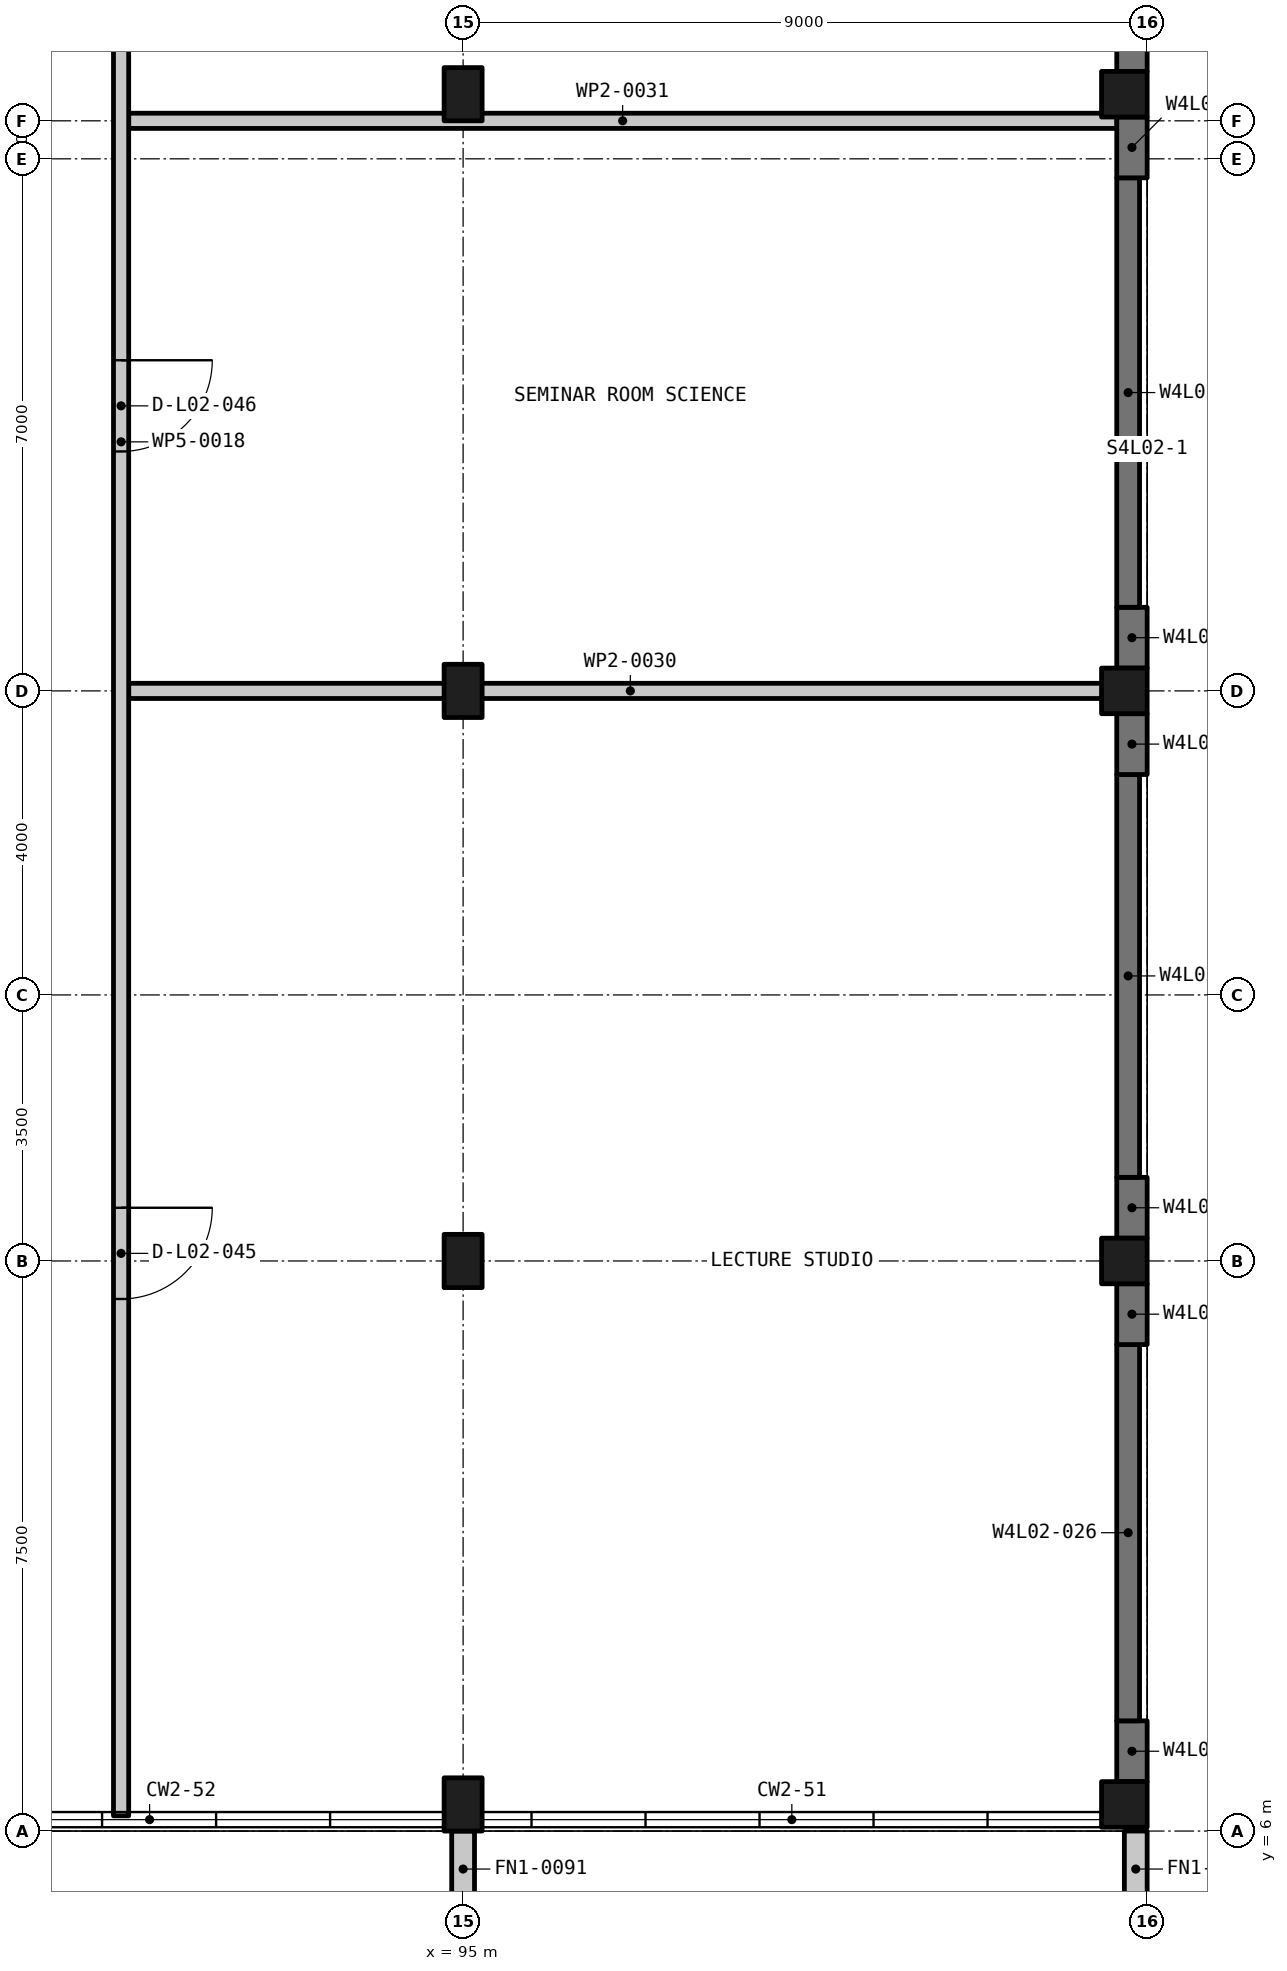
"""IFC4 building model, lengths in metres.
Left out: names, types, materials, properties, quantities, classifications, styles, units other than length and angle.
Written with IfcOpenShell. Run it as: python <this file> out.ifc"""

import sys

from ifc_helpers import new_model, si_unit, direction, frame, frame_2d, origin, origin_2d, place, context, subcontext, project, spatial, rectangle, extrude, element, fill, save


model = new_model("IFC4")
c1 = context("Model", 3, precision=1e-05, world=origin(), true_north=direction((0.0, 1.0)))
c2 = subcontext(c1, "Body", "Model", "MODEL_VIEW")
j1 = project(units=[si_unit("LENGTHUNIT", "METRE"), si_unit("PLANEANGLEUNIT", "RADIAN")], contexts=[c1])
p1 = place(None, origin())
s1 = spatial("IfcSite", under=j1, at=p1, CompositionType="ELEMENT")
p2 = place(p1, origin())
s2 = spatial("IfcBuilding", under=s1, at=p2, CompositionType="ELEMENT")
p3 = place(p2, frame((0.0, 0.0, 11.25)))
s3 = spatial("IfcBuildingStorey", under=s2, at=p3, CompositionType="ELEMENT", Elevation=11.25)
for number, where, z_axis, x_axis in (
    (1, (95.0, 6.35, -0.3), (0.0, 0.0, 1.0), (1.0, 0.0, 0.0)),
    (2, (95.0, 13.5, -0.3), (0.0, 0.0, 1.0), (1.0, 0.0, 0.0)),
    (3, (95.0, 21.0, -0.3), (0.0, 0.0, 1.0), (1.0, 0.0, 0.0)),
    (4, (95.0, 28.85, -0.3), (0.0, 0.0, 1.0), (1.0, 0.0, 0.0)),
):
    element("IfcColumn", number, at=place(p3, frame(where, z_axis=z_axis, x_axis=x_axis)), inside=s3, PredefinedType="COLUMN", context=c2, shape_type="SweptSolid", body=[
        extrude(rectangle(XDim=0.5, YDim=0.7, at=origin_2d()), origin(), (0.0, 0.0, 1.0), 4.5),
    ])
for number, where, z_axis, x_axis in (
    (5, (103.7, 6.35, -0.3), (0.0, 0.0, 1.0), (1.0, 0.0, 0.0)),
    (6, (103.7, 13.5, -0.3), (0.0, 0.0, 1.0), (1.0, 0.0, 0.0)),
    (7, (103.7, 21.0, -0.3), (0.0, 0.0, 1.0), (1.0, 0.0, 0.0)),
    (8, (103.7, 28.85, -0.3), (0.0, 0.0, 1.0), (1.0, 0.0, 0.0)),
):
    element("IfcColumn", number, at=place(p3, frame(where, z_axis=z_axis, x_axis=x_axis)), inside=s3, PredefinedType="COLUMN", context=c2, shape_type="SweptSolid", body=[
        extrude(rectangle(XDim=0.6, YDim=0.6, at=origin_2d()), origin(), (0.0, 0.0, 1.0), 4.5),
    ])
p4 = place(p3, frame((103.8, 6.65, -0.3), z_axis=(0.0, 0.0, 1.0), x_axis=(0.0, 1.0, 0.0)))
e9 = element("IfcWall", 9, at=p4, inside=s3, PredefinedType="SOLIDWALL", context=c2, shape_type="SweptSolid", body=[
    extrude(rectangle(XDim=0.8, YDim=0.4, at=frame_2d((0.4, 0.0))), origin(), (0.0, 0.0, 1.0), 4.5),
])
p5 = place(p3, frame((103.75, 7.45, -0.3), z_axis=(0.0, 0.0, 1.0), x_axis=(0.0, 1.0, 0.0)))
e10 = element("IfcWall", 10, at=p5, inside=s3, PredefinedType="SOLIDWALL", context=c2, shape_type="SweptSolid", body=[
    extrude(rectangle(XDim=4.95, YDim=0.3, at=frame_2d((2.475, 0.0))), origin(), (0.0, 0.0, 1.0), 4.5),
])
for number, where, z_axis, x_axis in (
    (11, (103.8, 12.4, -0.3), (0.0, 0.0, 1.0), (0.0, 1.0, 0.0)),
    (12, (103.8, 13.8, -0.3), (0.0, 0.0, 1.0), (0.0, 1.0, 0.0)),
):
    element("IfcWall", number, at=place(p3, frame(where, z_axis=z_axis, x_axis=x_axis)), inside=s3, PredefinedType="SOLIDWALL", context=c2, shape_type="SweptSolid", body=[
        extrude(rectangle(XDim=0.8, YDim=0.4, at=frame_2d((0.4, 0.0))), origin(), (0.0, 0.0, 1.0), 4.5),
    ])
p6 = place(p3, frame((103.75, 14.6, -0.3), z_axis=(0.0, 0.0, 1.0), x_axis=(0.0, 1.0, 0.0)))
e13 = element("IfcWall", 13, at=p6, inside=s3, PredefinedType="SOLIDWALL", context=c2, shape_type="SweptSolid", body=[
    extrude(rectangle(XDim=5.3, YDim=0.3, at=frame_2d((2.65, 0.0))), origin(), (0.0, 0.0, 1.0), 4.5),
])
for number, where, z_axis, x_axis in (
    (14, (103.8, 19.9, -0.3), (0.0, 0.0, 1.0), (0.0, 1.0, 0.0)),
    (15, (103.8, 21.3, -0.3), (0.0, 0.0, 1.0), (0.0, 1.0, 0.0)),
):
    element("IfcWall", number, at=place(p3, frame(where, z_axis=z_axis, x_axis=x_axis)), inside=s3, PredefinedType="SOLIDWALL", context=c2, shape_type="SweptSolid", body=[
        extrude(rectangle(XDim=0.8, YDim=0.4, at=frame_2d((0.4, 0.0))), origin(), (0.0, 0.0, 1.0), 4.5),
    ])
p7 = place(p3, frame((103.75, 22.1, -0.3), z_axis=(0.0, 0.0, 1.0), x_axis=(0.0, 1.0, 0.0)))
e16 = element("IfcWall", 16, at=p7, inside=s3, PredefinedType="SOLIDWALL", context=c2, shape_type="SweptSolid", body=[
    extrude(rectangle(XDim=5.65, YDim=0.3, at=frame_2d((2.825, 0.0))), origin(), (0.0, 0.0, 1.0), 4.5),
])
for number, where, z_axis, x_axis in (
    (17, (103.8, 27.75, -0.3), (0.0, 0.0, 1.0), (0.0, 1.0, 0.0)),
    (18, (103.8, 29.15, -0.3), (0.0, 0.0, 1.0), (0.0, 1.0, 0.0)),
):
    element("IfcWall", number, at=place(p3, frame(where, z_axis=z_axis, x_axis=x_axis)), inside=s3, PredefinedType="SOLIDWALL", context=c2, shape_type="SweptSolid", body=[
        extrude(rectangle(XDim=0.8, YDim=0.4, at=frame_2d((0.4, 0.0))), origin(), (0.0, 0.0, 1.0), 4.5),
    ])
for number, where, z_axis, x_axis in (
    (19, (95.0, 6.0, 0.0), (0.0, 0.0, 1.0), (0.0, -1.0, 0.0)),
    (20, (103.85, 6.0, 0.0), (0.0, 0.0, 1.0), (0.0, -1.0, 0.0)),
):
    element("IfcWall", number, at=place(p3, frame(where, z_axis=z_axis, x_axis=x_axis)), inside=s3, PredefinedType="SOLIDWALL", context=c2, shape_type="SweptSolid", body=[
        extrude(rectangle(XDim=1.0, YDim=0.3, at=frame_2d((0.5, 0.0))), origin(), (0.0, 0.0, 1.0), 4.5),
    ])
p8 = place(p3, frame((90.6, 21.0, 0.0), z_axis=(0.0, 0.0, 1.0), x_axis=(1.0, 0.0, 0.0)))
e21 = element("IfcWall", 21, at=p8, inside=s3, PredefinedType="PARTITIONING", context=c2, shape_type="SweptSolid", body=[
    extrude(rectangle(XDim=13.2, YDim=0.2, at=frame_2d((6.6, 0.0))), origin(), (0.0, 0.0, 1.0), 3.3),
])
p9 = place(p3, frame((90.6, 28.5, 0.0), z_axis=(0.0, 0.0, 1.0), x_axis=(1.0, 0.0, 0.0)))
e22 = element("IfcWall", 22, at=p9, inside=s3, PredefinedType="PARTITIONING", context=c2, shape_type="SweptSolid", body=[
    extrude(rectangle(XDim=12.998, YDim=0.2, at=frame_2d((6.499, 0.0))), origin(), (0.0, 0.0, 1.0), 3.4),
])
p10 = place(p3, frame((90.5, 80.8, 0.0), z_axis=(0.0, 0.0, 1.0), x_axis=(0.0, -1.0, 0.0)))
e23 = element("IfcWall", 23, at=p10, inside=s3, PredefinedType="PARTITIONING", context=c2, shape_type="SweptSolid", body=[
    extrude(rectangle(XDim=74.6, YDim=0.2, at=frame_2d((37.3, 0.0))), origin(), (0.0, 0.0, 1.0), 3.3),
])
p11 = place(p10, frame((66.6, 0.0, 0.0)))
e24 = element("IfcOpeningElement", 24, at=p11, cuts=e23, PredefinedType="OPENING", context=c2, shape_type="SweptSolid", body=[
    extrude(rectangle(XDim=1.2, YDim=2.1, at=frame_2d((0.6, 1.05))), frame((0.0, 0.11, 0.0), z_axis=(0.0, -1.0, 0.0), x_axis=(1.0, 0.0, 0.0)), (0.0, 0.0, 1.0), 0.22),
])
p12 = place(p10, frame((55.45, 0.0, 0.0)))
e25 = element("IfcOpeningElement", 25, at=p12, cuts=e23, PredefinedType="OPENING", context=c2, shape_type="SweptSolid", body=[
    extrude(rectangle(XDim=1.2, YDim=2.1, at=frame_2d((0.6, 1.05))), frame((0.0, 0.11, 0.0), z_axis=(0.0, -1.0, 0.0), x_axis=(1.0, 0.0, 0.0)), (0.0, 0.0, 1.0), 0.22),
])
p13 = place(p10, frame((44.2, 0.0, 0.0)))
e26 = element("IfcOpeningElement", 26, at=p13, cuts=e23, PredefinedType="OPENING", context=c2, shape_type="SweptSolid", body=[
    extrude(rectangle(XDim=1.2, YDim=2.1, at=frame_2d((0.6, 1.05))), frame((0.0, 0.11, 0.0), z_axis=(0.0, -1.0, 0.0), x_axis=(1.0, 0.0, 0.0)), (0.0, 0.0, 1.0), 0.22),
])
p14 = place(p10, frame((35.199, 0.0, 0.0)))
e27 = element("IfcOpeningElement", 27, at=p14, cuts=e23, PredefinedType="OPENING", context=c2, shape_type="SweptSolid", body=[
    extrude(rectangle(XDim=1.2, YDim=2.1, at=frame_2d((0.6, 1.05))), frame((0.0, 0.11, 0.0), z_axis=(0.0, -1.0, 0.0), x_axis=(1.0, 0.0, 0.0)), (0.0, 0.0, 1.0), 0.22),
])
p15 = place(p10, frame((14.2, 0.0, 0.0)))
e28 = element("IfcOpeningElement", 28, at=p15, cuts=e23, PredefinedType="OPENING", context=c2, shape_type="SweptSolid", body=[
    extrude(rectangle(XDim=1.2, YDim=2.1, at=frame_2d((0.6, 1.05))), frame((0.0, 0.11, 0.0), z_axis=(0.0, -1.0, 0.0), x_axis=(1.0, 0.0, 0.0)), (0.0, 0.0, 1.0), 0.22),
])
p16 = place(p10, frame((3.075, 0.0, 0.0)))
e29 = element("IfcOpeningElement", 29, at=p16, cuts=e23, PredefinedType="OPENING", context=c2, shape_type="SweptSolid", body=[
    extrude(rectangle(XDim=1.2, YDim=2.1, at=frame_2d((0.6, 1.05))), frame((0.0, 0.11, 0.0), z_axis=(0.0, -1.0, 0.0), x_axis=(1.0, 0.0, 0.0)), (0.0, 0.0, 1.0), 0.22),
])
p17 = place(p11, origin())
e30 = element("IfcDoor", 30, at=p17, inside=s3, OperationType="SINGLE_SWING_LEFT", PredefinedType="DOOR", context=c2, shape_type="SweptSolid", body=[
    extrude(rectangle(XDim=1.2, YDim=2.1, at=frame_2d((0.6, 1.05))), frame((0.0, 0.025, 0.0), z_axis=(0.0, -1.0, 0.0), x_axis=(1.0, 0.0, 0.0)), (0.0, 0.0, 1.0), 0.05),
])
fill(e24, e30)
p18 = place(p12, origin())
e31 = element("IfcDoor", 31, at=p18, inside=s3, OperationType="SINGLE_SWING_LEFT", PredefinedType="DOOR", context=c2, shape_type="SweptSolid", body=[
    extrude(rectangle(XDim=1.2, YDim=2.1, at=frame_2d((0.6, 1.05))), frame((0.0, 0.025, 0.0), z_axis=(0.0, -1.0, 0.0), x_axis=(1.0, 0.0, 0.0)), (0.0, 0.0, 1.0), 0.05),
])
fill(e25, e31)
save(model, sys.argv[1])
